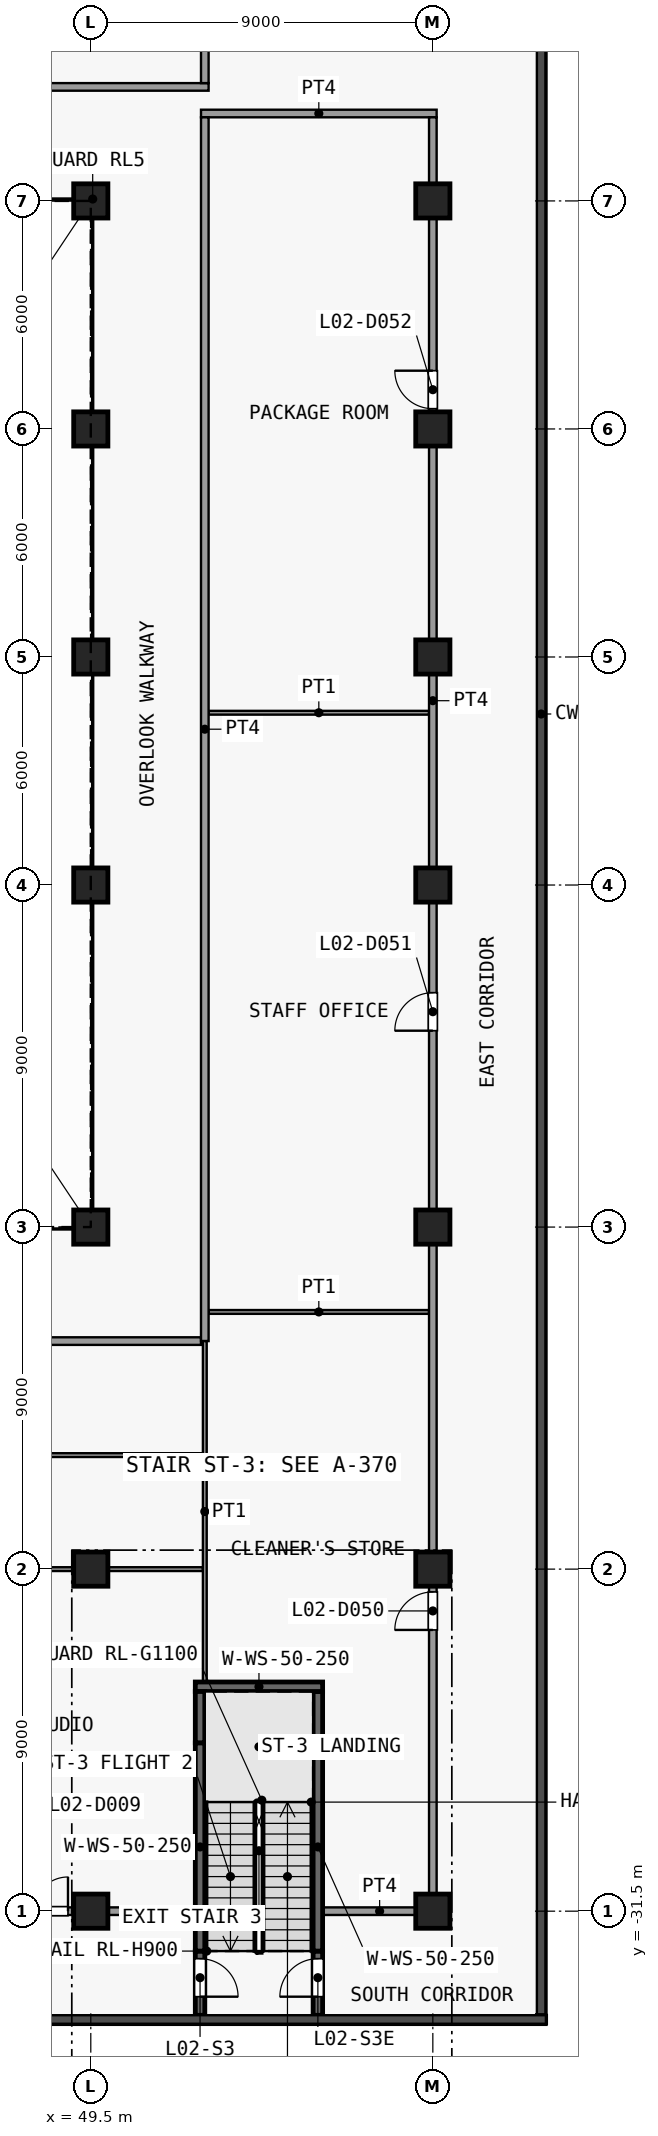
"""IFC4 building model, lengths in metres.
Left out: names, types, materials, properties, quantities, classifications, styles, units other than length and angle.
Written with IfcOpenShell. Run it as: python <this file> out.ifc"""

import sys

from ifc_helpers import new_model, si_unit, direction, frame, frame_2d, origin, origin_2d, place, context, subcontext, project, spatial, rectangle, extrude, element, fill, save


model = new_model("IFC4")
c1 = context("Model", 3, precision=1e-05, world=origin(), true_north=direction((0.0, 1.0)))
c2 = subcontext(c1, "Body", "Model", "MODEL_VIEW")
j1 = project(units=[si_unit("LENGTHUNIT", "METRE"), si_unit("PLANEANGLEUNIT", "RADIAN")], contexts=[c1])
p1 = place(None, origin())
s1 = spatial("IfcSite", under=j1, at=p1, CompositionType="ELEMENT")
p2 = place(p1, origin())
s2 = spatial("IfcBuilding", under=s1, at=p2, CompositionType="ELEMENT")
p3 = place(p2, frame((0.0, 0.0, 13.5)))
s3 = spatial("IfcBuildingStorey", under=s2, at=p3, CompositionType="ELEMENT", Elevation=13.5)
for number, where, z_axis, x_axis in (
    (1, (49.5, -31.5, 0.0), (0.0, 0.0, 1.0), (1.0, 0.0, 0.0)),
    (2, (49.5, -22.5, 0.0), (0.0, 0.0, 1.0), (1.0, 0.0, 0.0)),
    (3, (49.5, -13.5, 0.0), (0.0, 0.0, 1.0), (1.0, 0.0, 0.0)),
    (4, (49.5, -4.5, 0.0), (0.0, 0.0, 1.0), (1.0, 0.0, 0.0)),
    (5, (49.5, 1.5, 0.0), (0.0, 0.0, 1.0), (1.0, 0.0, 0.0)),
    (6, (49.5, 7.5, 0.0), (0.0, 0.0, 1.0), (1.0, 0.0, 0.0)),
    (7, (49.5, 13.5, 0.0), (0.0, 0.0, 1.0), (1.0, 0.0, 0.0)),
    (8, (58.5, -31.5, 0.0), (0.0, 0.0, 1.0), (1.0, 0.0, 0.0)),
    (9, (58.5, -22.5, 0.0), (0.0, 0.0, 1.0), (1.0, 0.0, 0.0)),
    (10, (58.5, -13.5, 0.0), (0.0, 0.0, 1.0), (1.0, 0.0, 0.0)),
    (11, (58.5, -4.5, 0.0), (0.0, 0.0, 1.0), (1.0, 0.0, 0.0)),
    (12, (58.5, 1.5, 0.0), (0.0, 0.0, 1.0), (1.0, 0.0, 0.0)),
    (13, (58.5, 7.5, 0.0), (0.0, 0.0, 1.0), (1.0, 0.0, 0.0)),
    (14, (58.5, 13.5, 0.0), (0.0, 0.0, 1.0), (1.0, 0.0, 0.0)),
):
    element("IfcColumn", number, at=place(p3, frame(where, z_axis=z_axis, x_axis=x_axis)), inside=s3, PredefinedType="COLUMN", context=c2, shape_type="SweptSolid", body=[
        extrude(rectangle(XDim=0.9, YDim=0.9, at=origin_2d()), origin(), (0.0, 0.0, 1.0), 5.0),
    ])
p4 = place(p3, frame((52.375, -32.55, 0.0), z_axis=(0.0, 0.0, 1.0), x_axis=(0.0, -1.0, 0.0)))
e15 = element("IfcWall", 15, at=p4, inside=s3, PredefinedType="SHEAR", context=c2, shape_type="SweptSolid", body=[
    extrude(rectangle(XDim=1.69, YDim=0.25, at=frame_2d((0.845, 0.0))), origin(), (0.0, 0.0, 1.0), 4.65),
])
p5 = place(p4, frame((0.2, 0.0, 0.0)))
e16 = element("IfcOpeningElement", 16, at=p5, cuts=e15, PredefinedType="OPENING", context=c2, shape_type="SweptSolid", body=[
    extrude(rectangle(XDim=1.0, YDim=2.1, at=frame_2d((0.5, 1.05))), frame((0.0, 0.135, 0.0), z_axis=(0.0, -1.0, 0.0), x_axis=(1.0, 0.0, 0.0)), (0.0, 0.0, 1.0), 0.27),
])
p6 = place(p3, frame((52.375, -32.55, 0.0), z_axis=(0.0, 0.0, 1.0), x_axis=(0.0, 1.0, 0.0)))
e17 = element("IfcWall", 17, at=p6, inside=s3, PredefinedType="SHEAR", context=c2, shape_type="SweptSolid", body=[
    extrude(rectangle(XDim=5.48, YDim=0.25, at=frame_2d((2.74, 0.0))), origin(), (0.0, 0.0, 1.0), 4.65),
])
p7 = place(p3, frame((52.375, -27.07, 0.0), z_axis=(0.0, 0.0, 1.0), x_axis=(0.0, 1.0, 0.0)))
e18 = element("IfcWall", 18, at=p7, inside=s3, PredefinedType="SHEAR", context=c2, shape_type="SweptSolid", body=[
    extrude(rectangle(XDim=1.35, YDim=0.25, at=frame_2d((0.675, 0.0))), origin(), (0.0, 0.0, 1.0), 4.65),
])
p8 = place(p3, frame((55.475, -34.24, 0.0), z_axis=(0.0, 0.0, 1.0), x_axis=(0.0, 1.0, 0.0)))
e19 = element("IfcWall", 19, at=p8, inside=s3, PredefinedType="SHEAR", context=c2, shape_type="SweptSolid", body=[
    extrude(rectangle(XDim=1.69, YDim=0.25, at=frame_2d((0.845, 0.0))), origin(), (0.0, 0.0, 1.0), 4.65),
])
p9 = place(p8, frame((0.49, 0.0, 0.0)))
e20 = element("IfcOpeningElement", 20, at=p9, cuts=e19, PredefinedType="OPENING", context=c2, shape_type="SweptSolid", body=[
    extrude(rectangle(XDim=1.0, YDim=2.1, at=frame_2d((0.5, 1.05))), frame((0.0, 0.135, 0.0), z_axis=(0.0, -1.0, 0.0), x_axis=(1.0, 0.0, 0.0)), (0.0, 0.0, 1.0), 0.27),
])
p10 = place(p3, frame((55.475, -32.55, 0.0), z_axis=(0.0, 0.0, 1.0), x_axis=(0.0, 1.0, 0.0)))
e21 = element("IfcWall", 21, at=p10, inside=s3, PredefinedType="SHEAR", context=c2, shape_type="SweptSolid", body=[
    extrude(rectangle(XDim=5.48, YDim=0.25, at=frame_2d((2.74, 0.0))), origin(), (0.0, 0.0, 1.0), 4.65),
])
p11 = place(p3, frame((55.475, -27.07, 0.0), z_axis=(0.0, 0.0, 1.0), x_axis=(0.0, 1.0, 0.0)))
e22 = element("IfcWall", 22, at=p11, inside=s3, PredefinedType="SHEAR", context=c2, shape_type="SweptSolid", body=[
    extrude(rectangle(XDim=1.35, YDim=0.25, at=frame_2d((0.675, 0.0))), origin(), (0.0, 0.0, 1.0), 4.65),
])
p12 = place(p3, frame((52.25, -25.595, 0.0), z_axis=(0.0, 0.0, 1.0), x_axis=(1.0, 0.0, 0.0)))
e23 = element("IfcWall", 23, at=p12, inside=s3, PredefinedType="SHEAR", context=c2, shape_type="SweptSolid", body=[
    extrude(rectangle(XDim=3.35, YDim=0.25, at=frame_2d((1.675, 0.0))), origin(), (0.0, 0.0, 1.0), 4.65),
])
p13 = place(p3, frame((-25.9, -31.5, 0.0), z_axis=(0.0, 0.0, 1.0), x_axis=(1.0, 0.0, 0.0)))
e24 = element("IfcWall", 24, at=p13, inside=s3, PredefinedType="PARTITIONING", context=c2, shape_type="SweptSolid", body=[
    extrude(rectangle(XDim=78.15, YDim=0.2, at=frame_2d((39.075, 0.0))), origin(), (0.0, 0.0, 1.0), 4.65),
])
p14 = place(p13, frame((4.0, 0.0, 0.0)))
e25 = element("IfcOpeningElement", 25, at=p14, cuts=e24, PredefinedType="OPENING", context=c2, shape_type="SweptSolid", body=[
    extrude(rectangle(XDim=1.8, YDim=2.1, at=frame_2d((0.9, 1.05))), frame((0.0, 0.11, 0.0), z_axis=(0.0, -1.0, 0.0), x_axis=(1.0, 0.0, 0.0)), (0.0, 0.0, 1.0), 0.22),
])
p15 = place(p13, frame((16.0, 0.0, 0.0)))
e26 = element("IfcOpeningElement", 26, at=p15, cuts=e24, PredefinedType="OPENING", context=c2, shape_type="SweptSolid", body=[
    extrude(rectangle(XDim=1.8, YDim=2.1, at=frame_2d((0.9, 1.05))), frame((0.0, 0.11, 0.0), z_axis=(0.0, -1.0, 0.0), x_axis=(1.0, 0.0, 0.0)), (0.0, 0.0, 1.0), 0.22),
])
p16 = place(p13, frame((24.1, 0.0, 0.0)))
e27 = element("IfcOpeningElement", 27, at=p16, cuts=e24, PredefinedType="OPENING", context=c2, shape_type="SweptSolid", body=[
    extrude(rectangle(XDim=1.0, YDim=2.1, at=frame_2d((0.5, 1.05))), frame((0.0, 0.11, 0.0), z_axis=(0.0, -1.0, 0.0), x_axis=(1.0, 0.0, 0.0)), (0.0, 0.0, 1.0), 0.22),
])
p17 = place(p13, frame((37.0, 0.0, 0.0)))
e28 = element("IfcOpeningElement", 28, at=p17, cuts=e24, PredefinedType="OPENING", context=c2, shape_type="SweptSolid", body=[
    extrude(rectangle(XDim=1.0, YDim=2.1, at=frame_2d((0.5, 1.05))), frame((0.0, 0.11, 0.0), z_axis=(0.0, -1.0, 0.0), x_axis=(1.0, 0.0, 0.0)), (0.0, 0.0, 1.0), 0.22),
])
p18 = place(p13, frame((46.4, 0.0, 0.0)))
e29 = element("IfcOpeningElement", 29, at=p18, cuts=e24, PredefinedType="OPENING", context=c2, shape_type="SweptSolid", body=[
    extrude(rectangle(XDim=1.0, YDim=2.1, at=frame_2d((0.5, 1.05))), frame((0.0, 0.11, 0.0), z_axis=(0.0, -1.0, 0.0), x_axis=(1.0, 0.0, 0.0)), (0.0, 0.0, 1.0), 0.22),
])
p19 = place(p13, frame((54.9, 0.0, 0.0)))
e30 = element("IfcOpeningElement", 30, at=p19, cuts=e24, PredefinedType="OPENING", context=c2, shape_type="SweptSolid", body=[
    extrude(rectangle(XDim=1.0, YDim=2.1, at=frame_2d((0.5, 1.05))), frame((0.0, 0.11, 0.0), z_axis=(0.0, -1.0, 0.0), x_axis=(1.0, 0.0, 0.0)), (0.0, 0.0, 1.0), 0.22),
])
p20 = place(p13, frame((60.1, 0.0, 0.0)))
e31 = element("IfcOpeningElement", 31, at=p20, cuts=e24, PredefinedType="OPENING", context=c2, shape_type="SweptSolid", body=[
    extrude(rectangle(XDim=1.0, YDim=2.1, at=frame_2d((0.5, 1.05))), frame((0.0, 0.11, 0.0), z_axis=(0.0, -1.0, 0.0), x_axis=(1.0, 0.0, 0.0)), (0.0, 0.0, 1.0), 0.22),
])
p21 = place(p13, frame((64.0, 0.0, 0.0)))
e32 = element("IfcOpeningElement", 32, at=p21, cuts=e24, PredefinedType="OPENING", context=c2, shape_type="SweptSolid", body=[
    extrude(rectangle(XDim=1.8, YDim=2.1, at=frame_2d((0.9, 1.05))), frame((0.0, 0.11, 0.0), z_axis=(0.0, -1.0, 0.0), x_axis=(1.0, 0.0, 0.0)), (0.0, 0.0, 1.0), 0.22),
])
p22 = place(p13, frame((73.0, 0.0, 0.0)))
e33 = element("IfcOpeningElement", 33, at=p22, cuts=e24, PredefinedType="OPENING", context=c2, shape_type="SweptSolid", body=[
    extrude(rectangle(XDim=1.8, YDim=2.1, at=frame_2d((0.9, 1.05))), frame((0.0, 0.11, 0.0), z_axis=(0.0, -1.0, 0.0), x_axis=(1.0, 0.0, 0.0)), (0.0, 0.0, 1.0), 0.22),
])
p23 = place(p3, frame((55.6, -31.5, 0.0), z_axis=(0.0, 0.0, 1.0), x_axis=(1.0, 0.0, 0.0)))
e34 = element("IfcWall", 34, at=p23, inside=s3, PredefinedType="PARTITIONING", context=c2, shape_type="SweptSolid", body=[
    extrude(rectangle(XDim=3.0, YDim=0.2, at=frame_2d((1.5, 0.0))), origin(), (0.0, 0.0, 1.0), 4.65),
])
p24 = place(p3, frame((31.5, -22.5, 0.0), z_axis=(0.0, 0.0, 1.0), x_axis=(1.0, 0.0, 0.0)))
e35 = element("IfcWall", 35, at=p24, inside=s3, PredefinedType="PARTITIONING", context=c2, shape_type="SweptSolid", body=[
    extrude(rectangle(XDim=20.95, YDim=0.1, at=frame_2d((10.475, 0.0))), origin(), (0.0, 0.0, 1.0), 4.65),
])
p25 = place(p3, frame((31.6, -19.5, 0.0), z_axis=(0.0, 0.0, 1.0), x_axis=(1.0, 0.0, 0.0)))
e36 = element("IfcWall", 36, at=p25, inside=s3, PredefinedType="PARTITIONING", context=c2, shape_type="SweptSolid", body=[
    extrude(rectangle(XDim=20.85, YDim=0.1, at=frame_2d((10.425, 0.0))), origin(), (0.0, 0.0, 1.0), 4.65),
])
p26 = place(p3, frame((31.4, -16.5, 0.0), z_axis=(0.0, 0.0, 1.0), x_axis=(1.0, 0.0, 0.0)))
e37 = element("IfcWall", 37, at=p26, inside=s3, PredefinedType="PARTITIONING", context=c2, shape_type="SweptSolid", body=[
    extrude(rectangle(XDim=21.0, YDim=0.2, at=frame_2d((10.5, 0.0))), origin(), (0.0, 0.0, 1.0), 4.65),
])
p27 = place(p26, frame((3.2, 0.0, 0.0)))
e38 = element("IfcOpeningElement", 38, at=p27, cuts=e37, PredefinedType="OPENING", context=c2, shape_type="SweptSolid", body=[
    extrude(rectangle(XDim=1.0, YDim=2.1, at=frame_2d((0.5, 1.05))), frame((0.0, 0.11, 0.0), z_axis=(0.0, -1.0, 0.0), x_axis=(1.0, 0.0, 0.0)), (0.0, 0.0, 1.0), 0.22),
])
p28 = place(p26, frame((14.0, 0.0, 0.0)))
e39 = element("IfcOpeningElement", 39, at=p28, cuts=e37, PredefinedType="OPENING", context=c2, shape_type="SweptSolid", body=[
    extrude(rectangle(XDim=1.0, YDim=2.1, at=frame_2d((0.5, 1.05))), frame((0.0, 0.11, 0.0), z_axis=(0.0, -1.0, 0.0), x_axis=(1.0, 0.0, 0.0)), (0.0, 0.0, 1.0), 0.22),
])
for number, where, z_axis, x_axis in (
    (40, (52.6, -15.733, 0.0), (0.0, 0.0, 1.0), (1.0, 0.0, 0.0)),
    (41, (52.6, 0.033, 0.0), (0.0, 0.0, 1.0), (1.0, 0.0, 0.0)),
):
    element("IfcWall", number, at=place(p3, frame(where, z_axis=z_axis, x_axis=x_axis)), inside=s3, PredefinedType="PARTITIONING", context=c2, shape_type="SweptSolid", body=[
        extrude(rectangle(XDim=5.8, YDim=0.1, at=frame_2d((2.9, 0.0))), origin(), (0.0, 0.0, 1.0), 4.65),
    ])
p29 = place(p3, frame((52.4, 15.8, 0.0), z_axis=(0.0, 0.0, 1.0), x_axis=(1.0, 0.0, 0.0)))
e42 = element("IfcWall", 42, at=p29, inside=s3, PredefinedType="PARTITIONING", context=c2, shape_type="SweptSolid", body=[
    extrude(rectangle(XDim=6.2, YDim=0.2, at=frame_2d((3.1, 0.0))), origin(), (0.0, 0.0, 1.0), 4.65),
])
p30 = place(p3, frame((28.4, 16.5, 0.0), z_axis=(0.0, 0.0, 1.0), x_axis=(1.0, 0.0, 0.0)))
e43 = element("IfcWall", 43, at=p30, inside=s3, PredefinedType="PARTITIONING", context=c2, shape_type="SweptSolid", body=[
    extrude(rectangle(XDim=24.2, YDim=0.2, at=frame_2d((12.1, 0.0))), origin(), (0.0, 0.0, 1.0), 4.65),
])
p31 = place(p30, frame((6.2, 0.0, 0.0)))
e44 = element("IfcOpeningElement", 44, at=p31, cuts=e43, PredefinedType="OPENING", context=c2, shape_type="SweptSolid", body=[
    extrude(rectangle(XDim=1.0, YDim=2.1, at=frame_2d((0.5, 1.05))), frame((0.0, 0.11, 0.0), z_axis=(0.0, -1.0, 0.0), x_axis=(1.0, 0.0, 0.0)), (0.0, 0.0, 1.0), 0.22),
])
p32 = place(p30, frame((17.0, 0.0, 0.0)))
e45 = element("IfcOpeningElement", 45, at=p32, cuts=e43, PredefinedType="OPENING", context=c2, shape_type="SweptSolid", body=[
    extrude(rectangle(XDim=1.0, YDim=2.1, at=frame_2d((0.5, 1.05))), frame((0.0, 0.11, 0.0), z_axis=(0.0, -1.0, 0.0), x_axis=(1.0, 0.0, 0.0)), (0.0, 0.0, 1.0), 0.22),
])
p33 = place(p3, frame((52.5, -16.5, 0.0), z_axis=(0.0, 0.0, 1.0), x_axis=(0.0, 1.0, 0.0)))
e46 = element("IfcWall", 46, at=p33, inside=s3, PredefinedType="PARTITIONING", context=c2, shape_type="SweptSolid", body=[
    extrude(rectangle(XDim=32.2, YDim=0.2, at=frame_2d((16.1, 0.0))), origin(), (0.0, 0.0, 1.0), 4.65),
])
p34 = place(p3, frame((52.5, 16.6, 0.0), z_axis=(0.0, 0.0, 1.0), x_axis=(0.0, 1.0, 0.0)))
e47 = element("IfcWall", 47, at=p34, inside=s3, PredefinedType="PARTITIONING", context=c2, shape_type="SweptSolid", body=[
    extrude(rectangle(XDim=8.87, YDim=0.2, at=frame_2d((4.435, 0.0))), origin(), (0.0, 0.0, 1.0), 4.65),
])
p35 = place(p34, frame((0.9, 0.0, 0.0)))
e48 = element("IfcOpeningElement", 48, at=p35, cuts=e47, PredefinedType="OPENING", context=c2, shape_type="SweptSolid", body=[
    extrude(rectangle(XDim=1.0, YDim=2.1, at=frame_2d((0.5, 1.05))), frame((0.0, 0.11, 0.0), z_axis=(0.0, -1.0, 0.0), x_axis=(1.0, 0.0, 0.0)), (0.0, 0.0, 1.0), 0.22),
])
p36 = place(p34, frame((3.6, 0.0, 0.0)))
e49 = element("IfcOpeningElement", 49, at=p36, cuts=e47, PredefinedType="OPENING", context=c2, shape_type="SweptSolid", body=[
    extrude(rectangle(XDim=1.0, YDim=2.1, at=frame_2d((0.5, 1.05))), frame((0.0, 0.11, 0.0), z_axis=(0.0, -1.0, 0.0), x_axis=(1.0, 0.0, 0.0)), (0.0, 0.0, 1.0), 0.22),
])
p37 = place(p34, frame((7.2, 0.0, 0.0)))
e50 = element("IfcOpeningElement", 50, at=p37, cuts=e47, PredefinedType="OPENING", context=c2, shape_type="SweptSolid", body=[
    extrude(rectangle(XDim=1.0, YDim=2.1, at=frame_2d((0.5, 1.05))), frame((0.0, 0.11, 0.0), z_axis=(0.0, -1.0, 0.0), x_axis=(1.0, 0.0, 0.0)), (0.0, 0.0, 1.0), 0.22),
])
p38 = place(p3, frame((52.5, -25.47, 0.0), z_axis=(0.0, 0.0, 1.0), x_axis=(0.0, 1.0, 0.0)))
e51 = element("IfcWall", 51, at=p38, inside=s3, PredefinedType="PARTITIONING", context=c2, shape_type="SweptSolid", body=[
    extrude(rectangle(XDim=8.97, YDim=0.1, at=frame_2d((4.485, 0.0))), origin(), (0.0, 0.0, 1.0), 4.65),
])
p39 = place(p3, frame((58.5, -31.4, 0.0), z_axis=(0.0, 0.0, 1.0), x_axis=(0.0, 1.0, 0.0)))
e52 = element("IfcWall", 52, at=p39, inside=s3, PredefinedType="PARTITIONING", context=c2, shape_type="SweptSolid", body=[
    extrude(rectangle(XDim=47.1, YDim=0.2, at=frame_2d((23.55, 0.0))), origin(), (0.0, 0.0, 1.0), 4.65),
])
p40 = place(p39, frame((7.3, 0.0, 0.0)))
e53 = element("IfcOpeningElement", 53, at=p40, cuts=e52, PredefinedType="OPENING", context=c2, shape_type="SweptSolid", body=[
    extrude(rectangle(XDim=1.0, YDim=2.1, at=frame_2d((0.5, 1.05))), frame((0.0, 0.11, 0.0), z_axis=(0.0, -1.0, 0.0), x_axis=(1.0, 0.0, 0.0)), (0.0, 0.0, 1.0), 0.22),
])
p41 = place(p39, frame((23.067, 0.0, 0.0)))
e54 = element("IfcOpeningElement", 54, at=p41, cuts=e52, PredefinedType="OPENING", context=c2, shape_type="SweptSolid", body=[
    extrude(rectangle(XDim=1.0, YDim=2.1, at=frame_2d((0.5, 1.05))), frame((0.0, 0.11, 0.0), z_axis=(0.0, -1.0, 0.0), x_axis=(1.0, 0.0, 0.0)), (0.0, 0.0, 1.0), 0.22),
])
p42 = place(p39, frame((39.433, 0.0, 0.0)))
e55 = element("IfcOpeningElement", 55, at=p42, cuts=e52, PredefinedType="OPENING", context=c2, shape_type="SweptSolid", body=[
    extrude(rectangle(XDim=1.0, YDim=2.1, at=frame_2d((0.5, 1.05))), frame((0.0, 0.11, 0.0), z_axis=(0.0, -1.0, 0.0), x_axis=(1.0, 0.0, 0.0)), (0.0, 0.0, 1.0), 0.22),
])
p43 = place(p5, origin())
e56 = element("IfcDoor", 56, at=p43, inside=s3, OperationType="SINGLE_SWING_RIGHT", PredefinedType="DOOR", context=c2, shape_type="SweptSolid", body=[
    extrude(rectangle(XDim=1.0, YDim=2.1, at=frame_2d((0.5, 1.05))), frame((0.0, 0.025, 0.0), z_axis=(0.0, -1.0, 0.0), x_axis=(1.0, 0.0, 0.0)), (0.0, 0.0, 1.0), 0.05),
])
fill(e16, e56)
p44 = place(p9, origin())
e57 = element("IfcDoor", 57, at=p44, inside=s3, OperationType="SINGLE_SWING_LEFT", PredefinedType="DOOR", context=c2, shape_type="SweptSolid", body=[
    extrude(rectangle(XDim=1.0, YDim=2.1, at=frame_2d((0.5, 1.05))), frame((0.0, 0.025, 0.0), z_axis=(0.0, -1.0, 0.0), x_axis=(1.0, 0.0, 0.0)), (0.0, 0.0, 1.0), 0.05),
])
fill(e20, e57)
p45 = place(p22, origin())
e58 = element("IfcDoor", 58, at=p45, inside=s3, OperationType="DOUBLE_DOOR_SINGLE_SWING", PredefinedType="DOOR", context=c2, shape_type="SweptSolid", body=[
    extrude(rectangle(XDim=1.8, YDim=2.1, at=frame_2d((0.9, 1.05))), frame((0.0, 0.025, 0.0), z_axis=(0.0, -1.0, 0.0), x_axis=(1.0, 0.0, 0.0)), (0.0, 0.0, 1.0), 0.05),
])
fill(e33, e58)
p46 = place(p40, origin())
e59 = element("IfcDoor", 59, at=p46, inside=s3, OperationType="SINGLE_SWING_RIGHT", PredefinedType="DOOR", context=c2, shape_type="SweptSolid", body=[
    extrude(rectangle(XDim=1.0, YDim=2.1, at=frame_2d((0.5, 1.05))), frame((0.0, 0.025, 0.0), z_axis=(0.0, -1.0, 0.0), x_axis=(1.0, 0.0, 0.0)), (0.0, 0.0, 1.0), 0.05),
])
fill(e53, e59)
p47 = place(p41, origin())
e60 = element("IfcDoor", 60, at=p47, inside=s3, OperationType="SINGLE_SWING_RIGHT", PredefinedType="DOOR", context=c2, shape_type="SweptSolid", body=[
    extrude(rectangle(XDim=1.0, YDim=2.1, at=frame_2d((0.5, 1.05))), frame((0.0, 0.025, 0.0), z_axis=(0.0, -1.0, 0.0), x_axis=(1.0, 0.0, 0.0)), (0.0, 0.0, 1.0), 0.05),
])
fill(e54, e60)
p48 = place(p42, origin())
e61 = element("IfcDoor", 61, at=p48, inside=s3, OperationType="SINGLE_SWING_LEFT", PredefinedType="DOOR", context=c2, shape_type="SweptSolid", body=[
    extrude(rectangle(XDim=1.0, YDim=2.1, at=frame_2d((0.5, 1.05))), frame((0.0, 0.025, 0.0), z_axis=(0.0, -1.0, 0.0), x_axis=(1.0, 0.0, 0.0)), (0.0, 0.0, 1.0), 0.05),
])
fill(e55, e61)
save(model, sys.argv[1])
